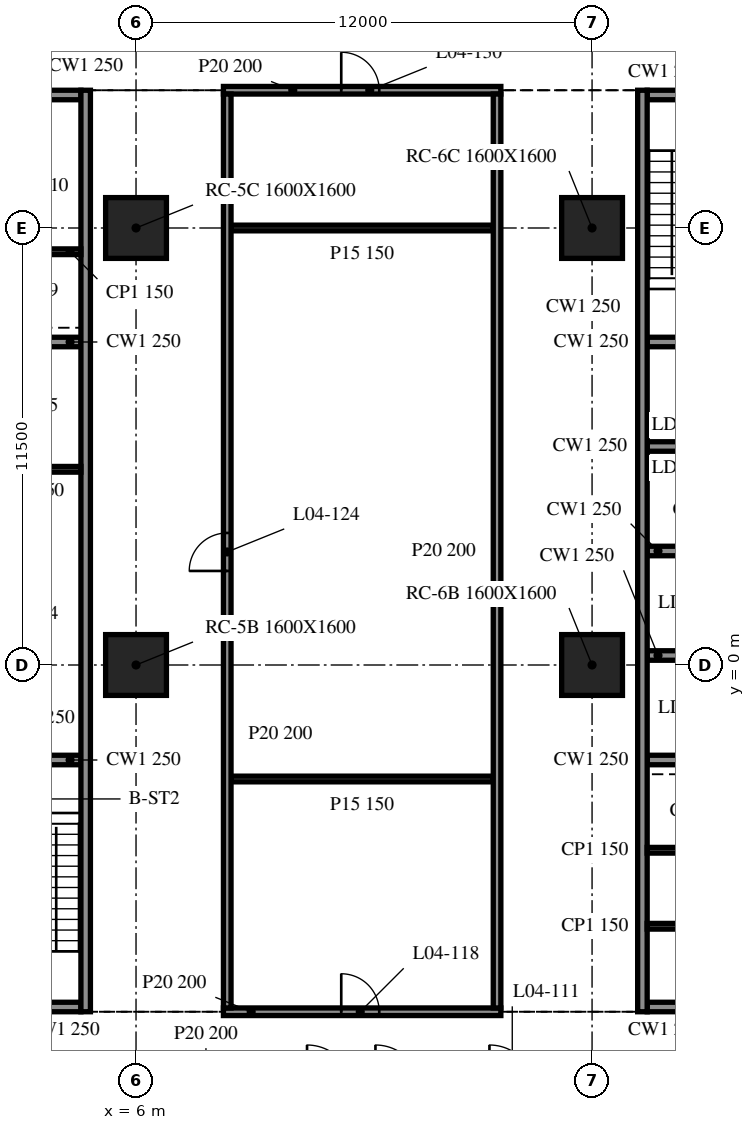
"""IFC4 building model, lengths in metres.
Left out: names, types, materials, properties, quantities, classifications, styles, units other than length and angle.
Written with IfcOpenShell. Run it as: python <this file> out.ifc"""

import sys

from ifc_helpers import new_model, si_unit, direction, frame, frame_2d, origin, origin_2d, place, context, subcontext, project, spatial, rectangle, extrude, element, fill, save


model = new_model("IFC4")
c1 = context("Model", 3, precision=1e-05, world=origin(), true_north=direction((0.0, 1.0)))
c2 = subcontext(c1, "Body", "Model", "MODEL_VIEW")
j1 = project(units=[si_unit("LENGTHUNIT", "METRE"), si_unit("PLANEANGLEUNIT", "RADIAN")], contexts=[c1])
p1 = place(None, origin())
s1 = spatial("IfcSite", under=j1, at=p1, CompositionType="ELEMENT")
p2 = place(p1, origin())
s2 = spatial("IfcBuilding", under=s1, at=p2, CompositionType="ELEMENT")
p3 = place(p2, frame((0.0, 0.0, 20.1)))
s3 = spatial("IfcBuildingStorey", under=s2, at=p3, CompositionType="ELEMENT", Elevation=20.1)
for number, where, z_axis, x_axis in (
    (1, (6.0, 0.0, -0.34), (0.0, 0.0, 1.0), (1.0, 0.0, 0.0)),
    (2, (6.0, 11.5, -0.34), (0.0, 0.0, 1.0), (1.0, 0.0, 0.0)),
    (3, (18.0, 0.0, -0.34), (0.0, 0.0, 1.0), (1.0, 0.0, 0.0)),
    (4, (18.0, 11.5, -0.34), (0.0, 0.0, 1.0), (1.0, 0.0, 0.0)),
):
    element("IfcColumn", number, at=place(p3, frame(where, z_axis=z_axis, x_axis=x_axis)), inside=s3, PredefinedType="COLUMN", context=c2, shape_type="SweptSolid", body=[
        extrude(rectangle(XDim=1.6, YDim=1.6, at=origin_2d()), origin(), (0.0, 0.0, 1.0), 4.3),
    ])
p4 = place(p3, frame((4.675, -9.125, 0.0), z_axis=(0.0, 0.0, 1.0), x_axis=(0.0, 1.0, 0.0)))
e5 = element("IfcWall", 5, at=p4, inside=s3, PredefinedType="SOLIDWALL", context=c2, shape_type="SweptSolid", body=[
    extrude(rectangle(XDim=24.25, YDim=0.25, at=frame_2d((12.125, 0.0))), origin(), (0.0, 0.0, 1.0), 3.96),
])
p5 = place(p3, frame((4.55, -9.0, 0.0), z_axis=(0.0, 0.0, 1.0), x_axis=(-1.0, 0.0, 0.0)))
e6 = element("IfcWall", 6, at=p5, inside=s3, PredefinedType="SOLIDWALL", context=c2, shape_type="SweptSolid", body=[
    extrude(rectangle(XDim=9.1, YDim=0.25, at=frame_2d((4.55, 0.0))), origin(), (0.0, 0.0, 1.0), 3.96),
])
p6 = place(p5, frame((3.65, 0.0, 0.0)))
e7 = element("IfcOpeningElement", 7, at=p6, cuts=e6, PredefinedType="OPENING", context=c2, shape_type="SweptSolid", body=[
    extrude(rectangle(XDim=1.8, YDim=2.1, at=frame_2d((0.9, 1.05))), frame((0.0, 0.135, 0.0), z_axis=(0.0, -1.0, 0.0), x_axis=(1.0, 0.0, 0.0)), (0.0, 0.0, 1.0), 0.27),
])
p7 = place(p3, frame((-4.55, 15.0, 0.0), z_axis=(0.0, 0.0, 1.0), x_axis=(1.0, 0.0, 0.0)))
e8 = element("IfcWall", 8, at=p7, inside=s3, PredefinedType="SOLIDWALL", context=c2, shape_type="SweptSolid", body=[
    extrude(rectangle(XDim=9.1, YDim=0.25, at=frame_2d((4.55, 0.0))), origin(), (0.0, 0.0, 1.0), 3.96),
])
p8 = place(p7, frame((3.65, 0.0, 0.0)))
e9 = element("IfcOpeningElement", 9, at=p8, cuts=e8, PredefinedType="OPENING", context=c2, shape_type="SweptSolid", body=[
    extrude(rectangle(XDim=1.8, YDim=2.1, at=frame_2d((0.9, 1.05))), frame((0.0, 0.135, 0.0), z_axis=(0.0, -1.0, 0.0), x_axis=(1.0, 0.0, 0.0)), (0.0, 0.0, 1.0), 0.27),
])
for number, where, z_axis, x_axis in (
    (10, (1.7, -2.5, 0.0), (0.0, 0.0, 1.0), (1.0, 0.0, 0.0)),
    (11, (1.7, 8.5, 0.0), (0.0, 0.0, 1.0), (1.0, 0.0, 0.0)),
):
    element("IfcWall", number, at=place(p3, frame(where, z_axis=z_axis, x_axis=x_axis)), inside=s3, PredefinedType="SOLIDWALL", context=c2, shape_type="SweptSolid", body=[
        extrude(rectangle(XDim=2.85, YDim=0.25, at=frame_2d((1.425, 0.0))), origin(), (0.0, 0.0, 1.0), 3.96),
    ])
for number, where, z_axis, x_axis in (
    (12, (1.7, 5.15, 0.0), (0.0, 0.0, 1.0), (1.0, 0.0, 0.0)),
    (13, (1.7, 10.875, 0.0), (0.0, 0.0, 1.0), (1.0, 0.0, 0.0)),
):
    element("IfcWall", number, at=place(p3, frame(where, z_axis=z_axis, x_axis=x_axis)), inside=s3, PredefinedType="PARTITIONING", context=c2, shape_type="SweptSolid", body=[
        extrude(rectangle(XDim=2.85, YDim=0.15, at=frame_2d((1.425, 0.0))), origin(), (0.0, 0.0, 1.0), 3.96),
    ])
p9 = place(p3, frame((19.325, 15.125, 0.0), z_axis=(0.0, 0.0, 1.0), x_axis=(0.0, -1.0, 0.0)))
e14 = element("IfcWall", 14, at=p9, inside=s3, PredefinedType="SOLIDWALL", context=c2, shape_type="SweptSolid", body=[
    extrude(rectangle(XDim=24.25, YDim=0.25, at=frame_2d((12.125, 0.0))), origin(), (0.0, 0.0, 1.0), 3.96),
])
p10 = place(p3, frame((28.55, -9.0, 0.0), z_axis=(0.0, 0.0, 1.0), x_axis=(-1.0, 0.0, 0.0)))
e15 = element("IfcWall", 15, at=p10, inside=s3, PredefinedType="SOLIDWALL", context=c2, shape_type="SweptSolid", body=[
    extrude(rectangle(XDim=9.1, YDim=0.25, at=frame_2d((4.55, 0.0))), origin(), (0.0, 0.0, 1.0), 3.96),
])
p11 = place(p10, frame((3.65, 0.0, 0.0)))
e16 = element("IfcOpeningElement", 16, at=p11, cuts=e15, PredefinedType="OPENING", context=c2, shape_type="SweptSolid", body=[
    extrude(rectangle(XDim=1.8, YDim=2.1, at=frame_2d((0.9, 1.05))), frame((0.0, 0.135, 0.0), z_axis=(0.0, -1.0, 0.0), x_axis=(1.0, 0.0, 0.0)), (0.0, 0.0, 1.0), 0.27),
])
p12 = place(p3, frame((19.45, 15.0, 0.0), z_axis=(0.0, 0.0, 1.0), x_axis=(1.0, 0.0, 0.0)))
e17 = element("IfcWall", 17, at=p12, inside=s3, PredefinedType="SOLIDWALL", context=c2, shape_type="SweptSolid", body=[
    extrude(rectangle(XDim=9.1, YDim=0.25, at=frame_2d((4.55, 0.0))), origin(), (0.0, 0.0, 1.0), 3.96),
])
p13 = place(p12, frame((3.65, 0.0, 0.0)))
e18 = element("IfcOpeningElement", 18, at=p13, cuts=e17, PredefinedType="OPENING", context=c2, shape_type="SweptSolid", body=[
    extrude(rectangle(XDim=1.8, YDim=2.1, at=frame_2d((0.9, 1.05))), frame((0.0, 0.135, 0.0), z_axis=(0.0, -1.0, 0.0), x_axis=(1.0, 0.0, 0.0)), (0.0, 0.0, 1.0), 0.27),
])
for number, where, z_axis, x_axis in (
    (19, (19.45, -2.5, 0.0), (0.0, 0.0, 1.0), (1.0, 0.0, 0.0)),
    (20, (19.45, 0.25, 0.0), (0.0, 0.0, 1.0), (1.0, 0.0, 0.0)),
    (21, (19.45, 3.0, 0.0), (0.0, 0.0, 1.0), (1.0, 0.0, 0.0)),
    (22, (19.45, 5.75, 0.0), (0.0, 0.0, 1.0), (1.0, 0.0, 0.0)),
    (23, (19.45, 8.5, 0.0), (0.0, 0.0, 1.0), (1.0, 0.0, 0.0)),
):
    element("IfcWall", number, at=place(p3, frame(where, z_axis=z_axis, x_axis=x_axis)), inside=s3, PredefinedType="SOLIDWALL", context=c2, shape_type="SweptSolid", body=[
        extrude(rectangle(XDim=2.85, YDim=0.25, at=frame_2d((1.425, 0.0))), origin(), (0.0, 0.0, 1.0), 3.96),
    ])
for number, where, z_axis, x_axis in (
    (24, (19.45, -6.875, 0.0), (0.0, 0.0, 1.0), (1.0, 0.0, 0.0)),
    (25, (19.45, -4.875, 0.0), (0.0, 0.0, 1.0), (1.0, 0.0, 0.0)),
):
    element("IfcWall", number, at=place(p3, frame(where, z_axis=z_axis, x_axis=x_axis)), inside=s3, PredefinedType="PARTITIONING", context=c2, shape_type="SweptSolid", body=[
        extrude(rectangle(XDim=2.85, YDim=0.15, at=frame_2d((1.425, 0.0))), origin(), (0.0, 0.0, 1.0), 3.96),
    ])
p14 = place(p3, frame((8.3, -9.125, 0.0), z_axis=(0.0, 0.0, 1.0), x_axis=(1.0, 0.0, 0.0)))
e26 = element("IfcWall", 26, at=p14, inside=s3, PredefinedType="PARTITIONING", context=c2, shape_type="SweptSolid", body=[
    extrude(rectangle(XDim=7.3, YDim=0.2, at=frame_2d((3.65, 0.0))), origin(), (0.0, 0.0, 1.0), 3.96),
])
p15 = place(p14, frame((3.1, 0.0, 0.0)))
e27 = element("IfcOpeningElement", 27, at=p15, cuts=e26, PredefinedType="OPENING", context=c2, shape_type="SweptSolid", body=[
    extrude(rectangle(XDim=1.0, YDim=2.1, at=frame_2d((0.5, 1.05))), frame((0.0, 0.11, 0.0), z_axis=(0.0, -1.0, 0.0), x_axis=(1.0, 0.0, 0.0)), (0.0, 0.0, 1.0), 0.22),
])
for number, where, z_axis, x_axis in (
    (28, (8.5, -3.0, 0.0), (0.0, 0.0, 1.0), (1.0, 0.0, 0.0)),
    (29, (8.5, 11.5, 0.0), (0.0, 0.0, 1.0), (1.0, 0.0, 0.0)),
):
    element("IfcWall", number, at=place(p3, frame(where, z_axis=z_axis, x_axis=x_axis)), inside=s3, PredefinedType="PARTITIONING", context=c2, shape_type="SweptSolid", body=[
        extrude(rectangle(XDim=6.9, YDim=0.15, at=frame_2d((3.45, 0.0))), origin(), (0.0, 0.0, 1.0), 3.96),
    ])
p16 = place(p3, frame((8.3, 15.125, 0.0), z_axis=(0.0, 0.0, 1.0), x_axis=(1.0, 0.0, 0.0)))
e30 = element("IfcWall", 30, at=p16, inside=s3, PredefinedType="PARTITIONING", context=c2, shape_type="SweptSolid", body=[
    extrude(rectangle(XDim=7.3, YDim=0.2, at=frame_2d((3.65, 0.0))), origin(), (0.0, 0.0, 1.0), 3.96),
])
p17 = place(p16, frame((3.1, 0.0, 0.0)))
e31 = element("IfcOpeningElement", 31, at=p17, cuts=e30, PredefinedType="OPENING", context=c2, shape_type="SweptSolid", body=[
    extrude(rectangle(XDim=1.0, YDim=2.1, at=frame_2d((0.5, 1.05))), frame((0.0, 0.11, 0.0), z_axis=(0.0, -1.0, 0.0), x_axis=(1.0, 0.0, 0.0)), (0.0, 0.0, 1.0), 0.22),
])
p18 = place(p3, frame((8.4, -9.025, 0.0), z_axis=(0.0, 0.0, 1.0), x_axis=(0.0, 1.0, 0.0)))
e32 = element("IfcWall", 32, at=p18, inside=s3, PredefinedType="PARTITIONING", context=c2, shape_type="SweptSolid", body=[
    extrude(rectangle(XDim=24.05, YDim=0.2, at=frame_2d((12.025, 0.0))), origin(), (0.0, 0.0, 1.0), 3.96),
])
p19 = place(p18, frame((11.5, 0.0, 0.0)))
e33 = element("IfcOpeningElement", 33, at=p19, cuts=e32, PredefinedType="OPENING", context=c2, shape_type="SweptSolid", body=[
    extrude(rectangle(XDim=1.0, YDim=2.1, at=frame_2d((0.5, 1.05))), frame((0.0, 0.11, 0.0), z_axis=(0.0, -1.0, 0.0), x_axis=(1.0, 0.0, 0.0)), (0.0, 0.0, 1.0), 0.22),
])
p20 = place(p3, frame((15.5, -9.025, 0.0), z_axis=(0.0, 0.0, 1.0), x_axis=(0.0, 1.0, 0.0)))
e34 = element("IfcWall", 34, at=p20, inside=s3, PredefinedType="PARTITIONING", context=c2, shape_type="SweptSolid", body=[
    extrude(rectangle(XDim=24.05, YDim=0.2, at=frame_2d((12.025, 0.0))), origin(), (0.0, 0.0, 1.0), 3.96),
])
p21 = place(p15, origin())
e35 = element("IfcDoor", 35, at=p21, inside=s3, OperationType="SINGLE_SWING_LEFT", PredefinedType="DOOR", context=c2, shape_type="SweptSolid", body=[
    extrude(rectangle(XDim=1.0, YDim=2.1, at=frame_2d((0.5, 1.05))), frame((0.0, 0.025, 0.0), z_axis=(0.0, -1.0, 0.0), x_axis=(1.0, 0.0, 0.0)), (0.0, 0.0, 1.0), 0.05),
])
fill(e27, e35)
p22 = place(p19, origin())
e36 = element("IfcDoor", 36, at=p22, inside=s3, OperationType="SINGLE_SWING_RIGHT", PredefinedType="DOOR", context=c2, shape_type="SweptSolid", body=[
    extrude(rectangle(XDim=1.0, YDim=2.1, at=frame_2d((0.5, 1.05))), frame((0.0, 0.025, 0.0), z_axis=(0.0, -1.0, 0.0), x_axis=(1.0, 0.0, 0.0)), (0.0, 0.0, 1.0), 0.05),
])
fill(e33, e36)
p23 = place(p17, origin())
e37 = element("IfcDoor", 37, at=p23, inside=s3, OperationType="SINGLE_SWING_RIGHT", PredefinedType="DOOR", context=c2, shape_type="SweptSolid", body=[
    extrude(rectangle(XDim=1.0, YDim=2.1, at=frame_2d((0.5, 1.05))), frame((0.0, 0.025, 0.0), z_axis=(0.0, -1.0, 0.0), x_axis=(1.0, 0.0, 0.0)), (0.0, 0.0, 1.0), 0.05),
])
fill(e31, e37)
save(model, sys.argv[1])
